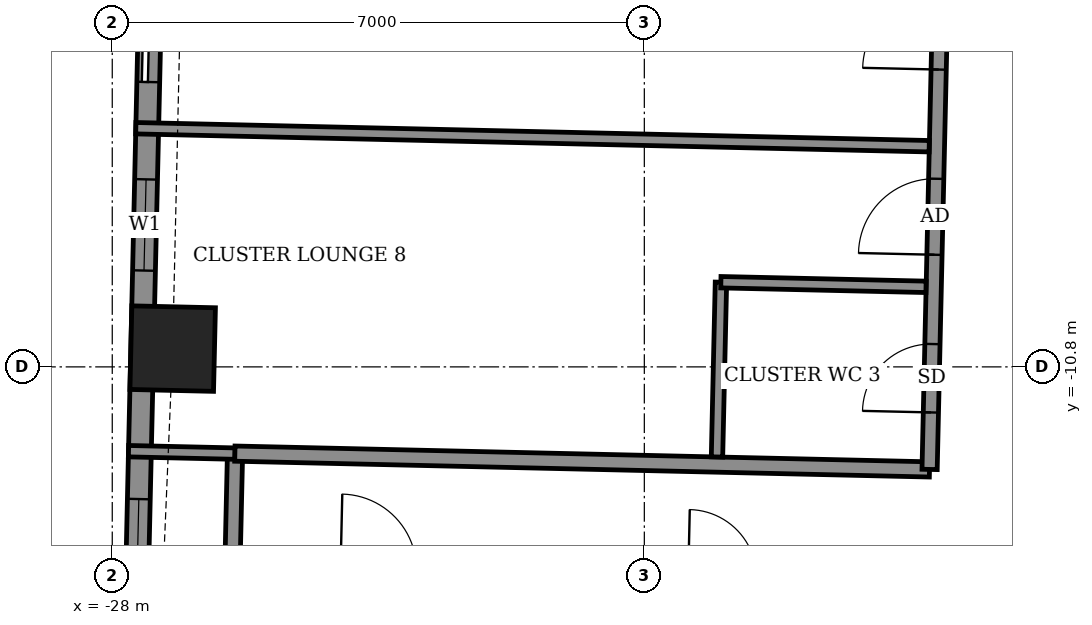
"""IFC4 building model, lengths in metres.
Left out: names, types, materials, properties, quantities, classifications, styles, units other than length and angle.
Written with IfcOpenShell. Run it as: python <this file> out.ifc"""

import sys

from ifc_helpers import new_model, si_unit, direction, frame, frame_2d, origin, origin_2d, place, context, subcontext, project, spatial, rectangle, extrude, element, fill, save


model = new_model("IFC4")
c1 = context("Model", 3, precision=1e-05, world=origin(), true_north=direction((0.0, 1.0)))
c2 = subcontext(c1, "Body", "Model", "MODEL_VIEW")
j1 = project(units=[si_unit("LENGTHUNIT", "METRE"), si_unit("PLANEANGLEUNIT", "RADIAN")], contexts=[c1])
p1 = place(None, origin())
s1 = spatial("IfcSite", under=j1, at=p1, CompositionType="ELEMENT")
p2 = place(p1, origin())
s2 = spatial("IfcBuilding", under=s1, at=p2, CompositionType="ELEMENT")
p3 = place(p2, frame((0.0, 0.0, 208.7)))
s3 = spatial("IfcBuildingStorey", under=s2, at=p3, CompositionType="ELEMENT", Elevation=208.7)
p4 = place(p3, frame((-27.205, -10.56, -0.55), z_axis=(0.0, 0.0, 1.0), x_axis=(-0.022750219004, -0.999741180274, 0.0)))
e1 = element("IfcColumn", 1, at=p4, inside=s3, PredefinedType="COLUMN", context=c2, shape_type="SweptSolid", body=[
    extrude(rectangle(XDim=1.1, YDim=1.1, at=origin_2d()), origin(), (0.0, 0.0, 1.0), 3.6),
])
p5 = place(p3, frame((-27.459, -4.091, 0.0), z_axis=(0.0, 0.0, 1.0), x_axis=(-0.022668325129, -0.999743040504, 0.0)))
e2 = element("IfcWall", 2, at=p5, inside=s3, PredefinedType="SOLIDWALL", context=c2, shape_type="SweptSolid", body=[
    extrude(rectangle(XDim=12.224, YDim=0.3, at=frame_2d((6.112, 0.0))), origin(), (0.0, 0.0, 1.0), 2.55),
])
p6 = place(p5, frame((1.462, 0.0, 0.0)))
e3 = element("IfcOpeningElement", 3, at=p6, cuts=e2, PredefinedType="OPENING", context=c2, shape_type="SweptSolid", body=[
    extrude(rectangle(XDim=1.5, YDim=2.4, at=frame_2d((0.75, 1.2))), frame((0.0, 0.16, 0.0), z_axis=(0.0, -1.0, 0.0), x_axis=(1.0, 0.0, 0.0)), (0.0, 0.0, 1.0), 0.32),
])
p7 = place(p5, frame((4.243, 0.0, 0.9)))
e4 = element("IfcOpeningElement", 4, at=p7, cuts=e2, PredefinedType="OPENING", context=c2, shape_type="SweptSolid", body=[
    extrude(rectangle(XDim=1.2, YDim=1.5, at=frame_2d((0.6, 0.75))), frame((0.0, 0.16, 0.0), z_axis=(0.0, -1.0, 0.0), x_axis=(1.0, 0.0, 0.0)), (0.0, 0.0, 1.0), 0.32),
])
p8 = place(p5, frame((8.45, 0.0, 0.9)))
e5 = element("IfcOpeningElement", 5, at=p8, cuts=e2, PredefinedType="OPENING", context=c2, shape_type="SweptSolid", body=[
    extrude(rectangle(XDim=2.4, YDim=1.5, at=frame_2d((1.2, 0.75))), frame((0.0, 0.16, 0.0), z_axis=(0.0, -1.0, 0.0), x_axis=(1.0, 0.0, 0.0)), (0.0, 0.0, 1.0), 0.32),
])
p9 = place(p3, frame((-26.419, -13.441, 0.0), z_axis=(0.0, 0.0, 1.0), x_axis=(0.022617910375, 0.999744182344, 0.0)))
e6 = element("IfcWall", 6, at=p9, inside=s3, PredefinedType="PARTITIONING", context=c2, shape_type="SweptSolid", body=[
    extrude(rectangle(XDim=1.5, YDim=0.2, at=frame_2d((0.75, 0.0))), origin(), (0.0, 0.0, 1.0), 3.05),
])
p10 = place(p3, frame((-27.786, -11.909, 0.0), z_axis=(0.0, 0.0, 1.0), x_axis=(0.999740216184, -0.022792545827, 0.0)))
e7 = element("IfcWall", 7, at=p10, inside=s3, PredefinedType="PARTITIONING", context=c2, shape_type="SweptSolid", body=[
    extrude(rectangle(XDim=1.403, YDim=0.15, at=frame_2d((0.702, 0.0))), origin(), (0.0, 0.0, 1.0), 2.55),
])
p11 = place(p3, frame((-26.387, -11.941, 0.0), z_axis=(0.0, 0.0, 1.0), x_axis=(0.999741076645, -0.022754772455, 0.0)))
e8 = element("IfcWall", 8, at=p11, inside=s3, PredefinedType="PARTITIONING", context=c2, shape_type="SweptSolid", body=[
    extrude(rectangle(XDim=9.141, YDim=0.2, at=frame_2d((4.571, 0.0))), origin(), (0.0, 0.0, 1.0), 3.05),
])
p12 = place(p3, frame((-20.044, -11.985, 0.0), z_axis=(0.0, 0.0, 1.0), x_axis=(0.022612884682, 0.999744296031, 0.0)))
e9 = element("IfcWall", 9, at=p12, inside=s3, PredefinedType="PARTITIONING", context=c2, shape_type="SweptSolid", body=[
    extrude(rectangle(XDim=2.3, YDim=0.15, at=frame_2d((1.15, 0.0))), origin(), (0.0, 0.0, 1.0), 3.05),
])
p13 = place(p3, frame((-17.247, -12.149, 0.0), z_axis=(0.0, 0.0, 1.0), x_axis=(0.022698146637, 0.999742363881, 0.0)))
e10 = element("IfcWall", 10, at=p13, inside=s3, PredefinedType="PARTITIONING", context=c2, shape_type="SweptSolid", body=[
    extrude(rectangle(XDim=28.374, YDim=0.2, at=frame_2d((14.187, 0.0))), origin(), (0.0, 0.0, 1.0), 3.05),
])
p14 = place(p13, frame((17.225, 0.0, 0.0)))
e11 = element("IfcOpeningElement", 11, at=p14, cuts=e10, PredefinedType="OPENING", context=c2, shape_type="SweptSolid", body=[
    extrude(rectangle(XDim=1.0, YDim=2.1, at=frame_2d((0.5, 1.05))), frame((0.0, 0.11, 0.0), z_axis=(0.0, -1.0, 0.0), x_axis=(1.0, 0.0, 0.0)), (0.0, 0.0, 1.0), 0.22),
])
p15 = place(p13, frame((19.375, 0.0, 0.0)))
e12 = element("IfcOpeningElement", 12, at=p15, cuts=e10, PredefinedType="OPENING", context=c2, shape_type="SweptSolid", body=[
    extrude(rectangle(XDim=0.9, YDim=2.1, at=frame_2d((0.45, 1.05))), frame((0.0, 0.11, 0.0), z_axis=(0.0, -1.0, 0.0), x_axis=(1.0, 0.0, 0.0)), (0.0, 0.0, 1.0), 0.22),
])
p16 = place(p13, frame((13.822, 0.0, 0.0)))
e13 = element("IfcOpeningElement", 13, at=p16, cuts=e10, PredefinedType="OPENING", context=c2, shape_type="SweptSolid", body=[
    extrude(rectangle(XDim=1.0, YDim=2.1, at=frame_2d((0.5, 1.05))), frame((0.0, 0.11, 0.0), z_axis=(0.0, -1.0, 0.0), x_axis=(1.0, 0.0, 0.0)), (0.0, 0.0, 1.0), 0.22),
])
p17 = place(p13, frame((10.25, 0.0, 0.0)))
e14 = element("IfcOpeningElement", 14, at=p17, cuts=e10, PredefinedType="OPENING", context=c2, shape_type="SweptSolid", body=[
    extrude(rectangle(XDim=1.0, YDim=2.1, at=frame_2d((0.5, 1.05))), frame((0.0, 0.11, 0.0), z_axis=(0.0, -1.0, 0.0), x_axis=(1.0, 0.0, 0.0)), (0.0, 0.0, 1.0), 0.22),
])
p18 = place(p13, frame((8.025, 0.0, 0.0)))
e15 = element("IfcOpeningElement", 15, at=p18, cuts=e10, PredefinedType="OPENING", context=c2, shape_type="SweptSolid", body=[
    extrude(rectangle(XDim=0.9, YDim=2.1, at=frame_2d((0.45, 1.05))), frame((0.0, 0.11, 0.0), z_axis=(0.0, -1.0, 0.0), x_axis=(1.0, 0.0, 0.0)), (0.0, 0.0, 1.0), 0.22),
])
p19 = place(p13, frame((5.262, 0.0, 0.0)))
e16 = element("IfcOpeningElement", 16, at=p19, cuts=e10, PredefinedType="OPENING", context=c2, shape_type="SweptSolid", body=[
    extrude(rectangle(XDim=1.0, YDim=2.1, at=frame_2d((0.5, 1.05))), frame((0.0, 0.11, 0.0), z_axis=(0.0, -1.0, 0.0), x_axis=(1.0, 0.0, 0.0)), (0.0, 0.0, 1.0), 0.22),
])
p20 = place(p13, frame((2.825, 0.0, 0.0)))
e17 = element("IfcOpeningElement", 17, at=p20, cuts=e10, PredefinedType="OPENING", context=c2, shape_type="SweptSolid", body=[
    extrude(rectangle(XDim=1.0, YDim=2.1, at=frame_2d((0.5, 1.05))), frame((0.0, 0.11, 0.0), z_axis=(0.0, -1.0, 0.0), x_axis=(1.0, 0.0, 0.0)), (0.0, 0.0, 1.0), 0.22),
])
p21 = place(p13, frame((0.75, 0.0, 0.0)))
e18 = element("IfcOpeningElement", 18, at=p21, cuts=e10, PredefinedType="OPENING", context=c2, shape_type="SweptSolid", body=[
    extrude(rectangle(XDim=0.9, YDim=2.1, at=frame_2d((0.45, 1.05))), frame((0.0, 0.11, 0.0), z_axis=(0.0, -1.0, 0.0), x_axis=(1.0, 0.0, 0.0)), (0.0, 0.0, 1.0), 0.22),
])
p22 = place(p3, frame((-19.993, -9.686, 0.0), z_axis=(0.0, 0.0, 1.0), x_axis=(0.999744396973, -0.02260842146, 0.0)))
e19 = element("IfcWall", 19, at=p22, inside=s3, PredefinedType="PARTITIONING", context=c2, shape_type="SweptSolid", body=[
    extrude(rectangle(XDim=2.7, YDim=0.15, at=frame_2d((1.35, 0.0))), origin(), (0.0, 0.0, 1.0), 3.05),
])
p23 = place(p3, frame((-27.69, -7.66, 0.0), z_axis=(0.0, 0.0, 1.0), x_axis=(0.99974219758, -0.022705470222, 0.0)))
e20 = element("IfcWall", 20, at=p23, inside=s3, PredefinedType="PARTITIONING", context=c2, shape_type="SweptSolid", body=[
    extrude(rectangle(XDim=10.441, YDim=0.15, at=frame_2d((5.22, 0.0))), origin(), (0.0, 0.0, 1.0), 2.55),
])
p24 = place(p6, origin())
e21 = element("IfcDoor", 21, at=p24, inside=s3, OperationType="SLIDING_TO_LEFT", PredefinedType="DOOR", context=c2, shape_type="SweptSolid", body=[
    extrude(rectangle(XDim=1.5, YDim=2.4, at=frame_2d((0.75, 1.2))), frame((0.0, 0.025, 0.0), z_axis=(0.0, -1.0, 0.0), x_axis=(1.0, 0.0, 0.0)), (0.0, 0.0, 1.0), 0.05),
])
fill(e3, e21)
p25 = place(p7, origin())
e22 = element("IfcWindow", 22, at=p25, inside=s3, PartitioningType="SINGLE_PANEL", PredefinedType="WINDOW", context=c2, shape_type="SweptSolid", body=[
    extrude(rectangle(XDim=1.2, YDim=1.5, at=frame_2d((0.6, 0.75))), frame((0.0, 0.03, 0.0), z_axis=(0.0, -1.0, 0.0), x_axis=(1.0, 0.0, 0.0)), (0.0, 0.0, 1.0), 0.06),
])
fill(e4, e22)
p26 = place(p8, origin())
e23 = element("IfcWindow", 23, at=p26, inside=s3, PartitioningType="DOUBLE_PANEL_VERTICAL", PredefinedType="WINDOW", context=c2, shape_type="SweptSolid", body=[
    extrude(rectangle(XDim=2.4, YDim=1.5, at=frame_2d((1.2, 0.75))), frame((0.0, 0.03, 0.0), z_axis=(0.0, -1.0, 0.0), x_axis=(1.0, 0.0, 0.0)), (0.0, 0.0, 1.0), 0.06),
])
fill(e5, e23)
p27 = place(p19, origin())
e24 = element("IfcDoor", 24, at=p27, inside=s3, OperationType="SINGLE_SWING_LEFT", PredefinedType="DOOR", context=c2, shape_type="SweptSolid", body=[
    extrude(rectangle(XDim=1.0, YDim=2.1, at=frame_2d((0.5, 1.05))), frame((0.0, 0.025, 0.0), z_axis=(0.0, -1.0, 0.0), x_axis=(1.0, 0.0, 0.0)), (0.0, 0.0, 1.0), 0.05),
])
fill(e16, e24)
p28 = place(p20, origin())
e25 = element("IfcDoor", 25, at=p28, inside=s3, OperationType="SINGLE_SWING_RIGHT", PredefinedType="DOOR", context=c2, shape_type="SweptSolid", body=[
    extrude(rectangle(XDim=1.0, YDim=2.1, at=frame_2d((0.5, 1.05))), frame((0.0, 0.025, 0.0), z_axis=(0.0, -1.0, 0.0), x_axis=(1.0, 0.0, 0.0)), (0.0, 0.0, 1.0), 0.05),
])
fill(e17, e25)
p29 = place(p21, origin())
e26 = element("IfcDoor", 26, at=p29, inside=s3, OperationType="SINGLE_SWING_RIGHT", PredefinedType="DOOR", context=c2, shape_type="SweptSolid", body=[
    extrude(rectangle(XDim=0.9, YDim=2.1, at=frame_2d((0.45, 1.05))), frame((0.0, 0.025, 0.0), z_axis=(0.0, -1.0, 0.0), x_axis=(1.0, 0.0, 0.0)), (0.0, 0.0, 1.0), 0.05),
])
fill(e18, e26)
save(model, sys.argv[1])
